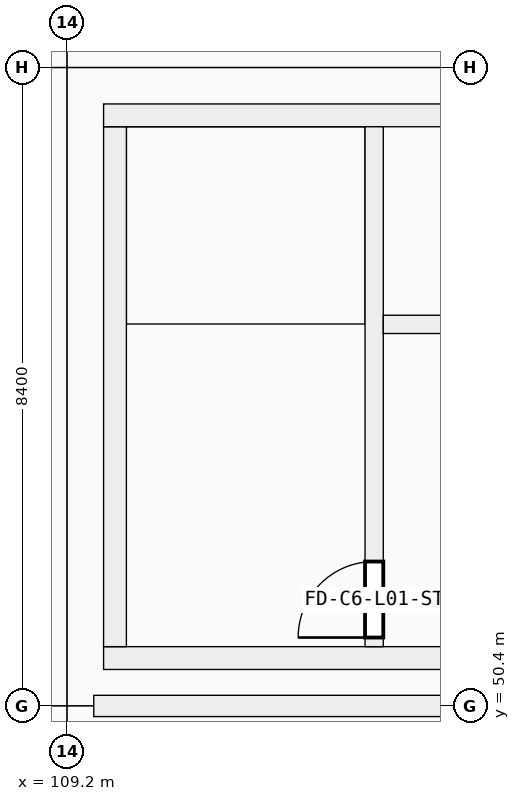
"""IFC4 building model, lengths in metres.
Left out: names, types, materials, properties, quantities, classifications, styles, units other than length and angle.
Written with IfcOpenShell. Run it as: python <this file> out.ifc"""

import sys

from ifc_helpers import new_model, si_unit, direction, frame, frame_2d, origin, origin_2d, place, context, subcontext, project, spatial, rectangle, extrude, element, fill, save


model = new_model("IFC4")
c1 = context("Model", 3, precision=1e-05, world=origin(), true_north=direction((0.0, 1.0)))
c2 = subcontext(c1, "Body", "Model", "MODEL_VIEW")
j1 = project(units=[si_unit("LENGTHUNIT", "METRE"), si_unit("PLANEANGLEUNIT", "RADIAN")], contexts=[c1])
p1 = place(None, origin())
s1 = spatial("IfcSite", under=j1, at=p1, CompositionType="ELEMENT")
p2 = place(p1, origin())
s2 = spatial("IfcBuilding", under=s1, at=p2, CompositionType="ELEMENT")
p3 = place(p2, frame((0.0, 0.0, 5.76)))
s3 = spatial("IfcBuildingStorey", under=s2, at=p3, CompositionType="ELEMENT", Elevation=5.76)
p4 = place(p3, frame((109.2, 50.4, 0.0), z_axis=(0.0, 0.0, 1.0), x_axis=(1.0, 0.0, 0.0)))
e1 = element("IfcColumn", 1, at=p4, inside=s3, PredefinedType="COLUMN", context=c2, shape_type="SweptSolid", body=[
    extrude(rectangle(XDim=0.7, YDim=0.7, at=origin_2d()), origin(), (0.0, 0.0, 1.0), 4.5),
])
p5 = place(p3, frame((109.2, 58.8, 0.0), z_axis=(0.0, 0.0, 1.0), x_axis=(1.0, 0.0, 0.0)))
e2 = element("IfcColumn", 2, at=p5, inside=s3, PredefinedType="COLUMN", context=c2, shape_type="SweptSolid", body=[
    extrude(rectangle(XDim=0.75, YDim=0.75, at=origin_2d()), origin(), (0.0, 0.0, 1.0), 4.5),
])
p6 = place(p3, frame((117.224, 50.4, 0.0), z_axis=(0.0, 0.0, 1.0), x_axis=(-1.0, 0.0, 0.0)))
e3 = element("IfcWall", 3, at=p6, inside=s3, PredefinedType="SOLIDWALL", context=c2, shape_type="SweptSolid", body=[
    extrude(rectangle(XDim=7.673, YDim=0.28, at=frame_2d((3.836, 0.0))), origin(), (0.0, 0.0, 1.0), 3.4),
])
p7 = place(p3, frame((117.12, 51.03, 0.0), z_axis=(0.0, 0.0, 1.0), x_axis=(-1.0, 0.0, 0.0)))
e4 = element("IfcWall", 4, at=p7, inside=s3, PredefinedType="SHEAR", context=c2, shape_type="SweptSolid", body=[
    extrude(rectangle(XDim=7.44, YDim=0.3, at=frame_2d((3.72, 0.0))), origin(), (0.0, 0.0, 1.0), 4.5),
])
p8 = place(p3, frame((109.83, 51.18, 0.0), z_axis=(0.0, 0.0, 1.0), x_axis=(0.0, 1.0, 0.0)))
e5 = element("IfcWall", 5, at=p8, inside=s3, PredefinedType="SHEAR", context=c2, shape_type="SweptSolid", body=[
    extrude(rectangle(XDim=6.84, YDim=0.3, at=frame_2d((3.42, 0.0))), origin(), (0.0, 0.0, 1.0), 4.5),
])
p9 = place(p3, frame((109.68, 58.17, 0.0), z_axis=(0.0, 0.0, 1.0), x_axis=(1.0, 0.0, 0.0)))
e6 = element("IfcWall", 6, at=p9, inside=s3, PredefinedType="SHEAR", context=c2, shape_type="SweptSolid", body=[
    extrude(rectangle(XDim=7.44, YDim=0.3, at=frame_2d((3.72, 0.0))), origin(), (0.0, 0.0, 1.0), 4.5),
])
p10 = place(p3, frame((113.24, 51.18, 0.0), z_axis=(0.0, 0.0, 1.0), x_axis=(0.0, 1.0, 0.0)))
e7 = element("IfcWall", 7, at=p10, inside=s3, PredefinedType="SHEAR", context=c2, shape_type="SweptSolid", body=[
    extrude(rectangle(XDim=6.84, YDim=0.24, at=frame_2d((3.42, 0.0))), origin(), (0.0, 0.0, 1.0), 4.5),
])
p11 = place(p10, frame((0.12, 0.0, 0.0)))
e8 = element("IfcOpeningElement", 8, at=p11, cuts=e7, PredefinedType="OPENING", context=c2, shape_type="SweptSolid", body=[
    extrude(rectangle(XDim=1.0, YDim=2.15, at=frame_2d((0.5, 1.075))), frame((0.0, 0.12, 0.0), z_axis=(0.0, -1.0, 0.0), x_axis=(1.0, 0.0, 0.0)), (0.0, 0.0, 1.0), 0.24),
])
p12 = place(p3, frame((113.36, 55.42, 0.0), z_axis=(0.0, 0.0, 1.0), x_axis=(1.0, 0.0, 0.0)))
e9 = element("IfcWall", 9, at=p12, inside=s3, PredefinedType="SHEAR", context=c2, shape_type="SweptSolid", body=[
    extrude(rectangle(XDim=3.46, YDim=0.24, at=frame_2d((1.73, 0.0))), origin(), (0.0, 0.0, 1.0), 4.5),
])
p13 = place(p12, frame((1.18, 0.0, 0.0)))
e10 = element("IfcOpeningElement", 10, at=p13, cuts=e9, PredefinedType="OPENING", context=c2, shape_type="SweptSolid", body=[
    extrude(rectangle(XDim=1.1, YDim=2.15, at=frame_2d((0.55, 1.075))), frame((0.0, 0.12, 0.0), z_axis=(0.0, -1.0, 0.0), x_axis=(1.0, 0.0, 0.0)), (0.0, 0.0, 1.0), 0.24),
])
p14 = place(p11, origin())
e11 = element("IfcDoor", 11, at=p14, inside=s3, OperationType="SINGLE_SWING_LEFT", PredefinedType="DOOR", context=c2, shape_type="SweptSolid", body=[
    extrude(rectangle(XDim=1.0, YDim=2.15, at=frame_2d((0.5, 1.075))), frame((0.0, 0.025, 0.0), z_axis=(0.0, -1.0, 0.0), x_axis=(1.0, 0.0, 0.0)), (0.0, 0.0, 1.0), 0.05),
])
fill(e8, e11)
save(model, sys.argv[1])
